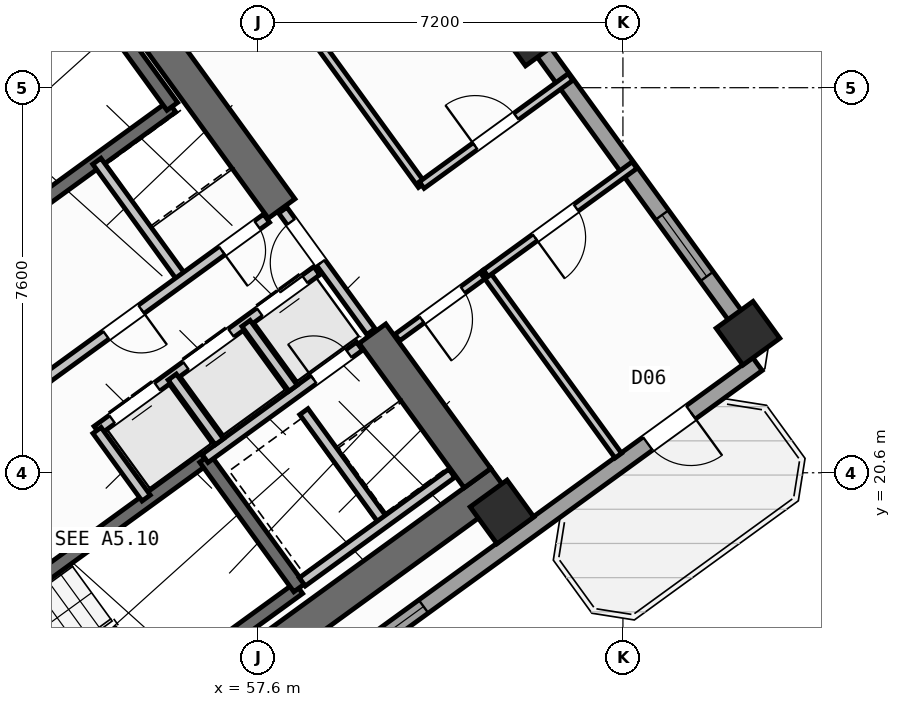
"""IFC4 building model, lengths in metres.
Left out: names, types, materials, properties, quantities, classifications, styles, units other than length and angle.
Written with IfcOpenShell. Run it as: python <this file> out.ifc"""

import sys

from ifc_helpers import new_model, si_unit, direction, frame, frame_2d, origin, origin_2d, place, context, subcontext, project, spatial, rectangle, hollow_rectangle, extrude, source, transform, mapped, element, fill, save


model = new_model("IFC4")
c1 = context("Model", 3, precision=1e-05, world=origin(), true_north=direction((0.0, 1.0)))
c2 = subcontext(c1, "Body", "Model", "MODEL_VIEW")
j1 = project(units=[si_unit("LENGTHUNIT", "METRE"), si_unit("PLANEANGLEUNIT", "RADIAN")], contexts=[c1])
p1 = place(None, origin())
s1 = spatial("IfcSite", under=j1, at=p1, CompositionType="ELEMENT")
p2 = place(p1, origin())
s2 = spatial("IfcBuilding", under=s1, at=p2, CompositionType="ELEMENT")
p3 = place(p2, frame((0.0, 0.0, 97.2)))
s3 = spatial("IfcBuildingStorey", under=s2, at=p3, CompositionType="ELEMENT", Elevation=97.2)
p4 = place(p3, frame((52.318, 13.11, 0.0), z_axis=(0.0, 0.0, 1.0), x_axis=(0.809019445368, 0.587781878776, 0.0)))
e1 = element("IfcWall", 1, at=p4, inside=s3, PredefinedType="SHEAR", context=c2, shape_type="SweptSolid", body=[
    extrude(rectangle(XDim=12.44, YDim=0.65, at=frame_2d((6.22, 0.0))), origin(), (0.0, 0.0, 1.0), 3.32),
])
p5 = place(p3, frame((44.325, 24.113, 0.0), z_axis=(0.0, 0.0, 1.0), x_axis=(0.809012664862, 0.58779121131, 0.0)))
e2 = element("IfcWall", 2, at=p5, inside=s3, PredefinedType="SHEAR", context=c2, shape_type="SweptSolid", body=[
    extrude(rectangle(XDim=12.44, YDim=0.65, at=frame_2d((6.22, 0.0))), origin(), (0.0, 0.0, 1.0), 3.32),
])
p6 = place(p3, frame((61.929, 20.494, 0.0), z_axis=(0.0, 0.0, 1.0), x_axis=(-0.58782982593, 0.808984607855, 0.0)))
e3 = element("IfcWall", 3, at=p6, inside=s3, PredefinedType="SHEAR", context=c2, shape_type="SweptSolid", body=[
    extrude(rectangle(XDim=3.525, YDim=0.65, at=frame_2d((1.762, 0.0))), origin(), (0.0, 0.0, 1.0), 3.32),
])
p7 = place(p3, frame((58.064, 25.813, 0.0), z_axis=(0.0, 0.0, 1.0), x_axis=(-0.58777996584, 0.809020835181, 0.0)))
e4 = element("IfcWall", 4, at=p7, inside=s3, PredefinedType="SHEAR", context=c2, shape_type="SweptSolid", body=[
    extrude(rectangle(XDim=6.375, YDim=0.65, at=frame_2d((3.188, 0.0))), origin(), (0.0, 0.0, 1.0), 3.32),
])
m1 = source(origin(), c2, "Body", "SweptSolid", [
    extrude(hollow_rectangle(XDim=0.9, YDim=0.9, WallThickness=0.036, at=origin_2d()), origin(), (0.0, 0.0, 1.0), 3.6),
])
for number, where, z_axis, x_axis in (
    (5, (62.414, 19.827, 0.0), (0.0, 0.0, 1.0), (0.809, 0.588, 0.0)),
    (6, (67.268, 23.354, 0.0), (0.0, 0.0, 1.0), (0.809, 0.588, 0.0)),
    (7, (62.977, 29.259, 0.0), (0.0, 0.0, 1.0), (0.809, 0.588, 0.0)),
):
    element("IfcColumn", number, at=place(p3, frame(where, z_axis=z_axis, x_axis=x_axis)), inside=s3, PredefinedType="COLUMN", context=c2, shape_type="MappedRepresentation", body=[
        mapped(m1, transform((0.0, 0.0, 0.0), scale=1.0)),
    ])
p8 = place(p3, frame((54.81, 40.5, 0.0), z_axis=(0.0, 0.0, 1.0), x_axis=(0.587783625747, -0.809018176127, 0.0)))
e8 = element("IfcWall", 8, at=p8, inside=s3, PredefinedType="STANDARD", context=c2, shape_type="SweptSolid", body=[
    extrude(rectangle(XDim=21.587, YDim=0.32, at=frame_2d((10.794, 0.0))), origin(), (0.0, 0.0, 1.0), 2.745),
])
p9 = place(p8, frame((2.143, 0.0, 0.8)))
e9 = element("IfcOpeningElement", 9, at=p9, cuts=e8, PredefinedType="OPENING", context=c2, shape_type="SweptSolid", body=[
    extrude(rectangle(XDim=2.1, YDim=1.55, at=frame_2d((1.05, 0.775))), frame((0.0, 0.17, 0.0), z_axis=(0.0, -1.0, 0.0), x_axis=(1.0, 0.0, 0.0)), (0.0, 0.0, 1.0), 0.34),
])
p10 = place(p8, frame((9.344, 0.0, 0.85)))
e10 = element("IfcOpeningElement", 10, at=p10, cuts=e8, PredefinedType="OPENING", context=c2, shape_type="SweptSolid", body=[
    extrude(rectangle(XDim=1.8, YDim=1.5, at=frame_2d((0.9, 0.75))), frame((0.0, 0.17, 0.0), z_axis=(0.0, -1.0, 0.0), x_axis=(1.0, 0.0, 0.0)), (0.0, 0.0, 1.0), 0.34),
])
p11 = place(p8, frame((18.309, 0.0, 0.85)))
e11 = element("IfcOpeningElement", 11, at=p11, cuts=e8, PredefinedType="OPENING", context=c2, shape_type="SweptSolid", body=[
    extrude(rectangle(XDim=1.5, YDim=1.5, at=frame_2d((0.75, 0.75))), frame((0.0, 0.17, 0.0), z_axis=(0.0, -1.0, 0.0), x_axis=(1.0, 0.0, 0.0)), (0.0, 0.0, 1.0), 0.34),
])
p12 = place(p3, frame((67.454, 22.747, 0.0), z_axis=(0.0, 0.0, 1.0), x_axis=(-0.809021120468, -0.587779573171, 0.0)))
e12 = element("IfcWall", 12, at=p12, inside=s3, PredefinedType="STANDARD", context=c2, shape_type="SweptSolid", body=[
    extrude(rectangle(XDim=17.588, YDim=0.32, at=frame_2d((8.794, 0.0))), origin(), (0.0, 0.0, 1.0), 3.32),
])
p13 = place(p12, frame((1.624, 0.0, 0.0)))
e13 = element("IfcOpeningElement", 13, at=p13, cuts=e12, PredefinedType="OPENING", context=c2, shape_type="SweptSolid", body=[
    extrude(rectangle(XDim=1.05, YDim=2.15, at=frame_2d((0.525, 1.075))), frame((0.0, 0.17, 0.0), z_axis=(0.0, -1.0, 0.0), x_axis=(1.0, 0.0, 0.0)), (0.0, 0.0, 1.0), 0.34),
])
p14 = place(p12, frame((8.144, 0.0, 0.8)))
e14 = element("IfcOpeningElement", 14, at=p14, cuts=e12, PredefinedType="OPENING", context=c2, shape_type="SweptSolid", body=[
    extrude(rectangle(XDim=2.1, YDim=1.55, at=frame_2d((1.05, 0.775))), frame((0.0, 0.17, 0.0), z_axis=(0.0, -1.0, 0.0), x_axis=(1.0, 0.0, 0.0)), (0.0, 0.0, 1.0), 0.34),
])
p15 = place(p12, frame((13.344, 0.0, 0.8)))
e15 = element("IfcOpeningElement", 15, at=p15, cuts=e12, PredefinedType="OPENING", context=c2, shape_type="SweptSolid", body=[
    extrude(rectangle(XDim=2.1, YDim=1.55, at=frame_2d((1.05, 0.775))), frame((0.0, 0.17, 0.0), z_axis=(0.0, -1.0, 0.0), x_axis=(1.0, 0.0, 0.0)), (0.0, 0.0, 1.0), 0.34),
])
p16 = place(p3, frame((48.006, 25.996, 0.0), z_axis=(0.0, 0.0, 1.0), x_axis=(0.80901903764, 0.587782439969, 0.0)))
e16 = element("IfcWall", 16, at=p16, inside=s3, PredefinedType="SHEAR", context=c2, shape_type="SweptSolid", body=[
    extrude(rectangle(XDim=7.46, YDim=0.26, at=frame_2d((3.73, 0.0))), origin(), (0.0, 0.0, 1.0), 3.32),
])
p17 = place(p3, frame((49.863, 23.44, 0.0), z_axis=(0.0, 0.0, 1.0), x_axis=(0.809003474932, 0.587803859759, 0.0)))
e17 = element("IfcWall", 17, at=p17, inside=s3, PredefinedType="SHEAR", context=c2, shape_type="SweptSolid", body=[
    extrude(rectangle(XDim=7.46, YDim=0.26, at=frame_2d((3.73, 0.0))), origin(), (0.0, 0.0, 1.0), 3.32),
])
p18 = place(p17, frame((0.36, 0.0, 0.0)))
e18 = element("IfcOpeningElement", 18, at=p18, cuts=e17, PredefinedType="OPENING", context=c2, shape_type="SweptSolid", body=[
    extrude(rectangle(XDim=0.86, YDim=2.05, at=frame_2d((0.43, 1.025))), frame((0.0, 0.14, 0.0), z_axis=(0.0, -1.0, 0.0), x_axis=(1.0, 0.0, 0.0)), (0.0, 0.0, 1.0), 0.28),
])
p19 = place(p3, frame((55.906, 27.831, 0.0), z_axis=(0.0, 0.0, 1.0), x_axis=(-0.587804123638, 0.809003283204, 0.0)))
e19 = element("IfcWall", 19, at=p19, inside=s3, PredefinedType="SHEAR", context=c2, shape_type="SweptSolid", body=[
    extrude(rectangle(XDim=3.16, YDim=0.26, at=frame_2d((1.58, 0.0))), origin(), (0.0, 0.0, 1.0), 3.32),
])
p20 = place(p3, frame((52.472, 14.013, 0.0), z_axis=(0.0, 0.0, 1.0), x_axis=(0.809028366311, 0.587769599847, 0.0)))
e20 = element("IfcWall", 20, at=p20, inside=s3, PredefinedType="SHEAR", context=c2, shape_type="SweptSolid", body=[
    extrude(rectangle(XDim=7.33, YDim=0.26, at=frame_2d((3.665, 0.0))), origin(), (0.0, 0.0, 1.0), 3.32),
])
p21 = place(p3, frame((50.615, 16.57, 0.0), z_axis=(0.0, 0.0, 1.0), x_axis=(0.809028366311, 0.587769599847, 0.0)))
e21 = element("IfcWall", 21, at=p21, inside=s3, PredefinedType="SHEAR", context=c2, shape_type="SweptSolid", body=[
    extrude(rectangle(XDim=7.33, YDim=0.26, at=frame_2d((3.665, 0.0))), origin(), (0.0, 0.0, 1.0), 3.32),
])
p22 = place(p21, frame((0.22, 0.0, 0.0)))
e22 = element("IfcOpeningElement", 22, at=p22, cuts=e21, PredefinedType="OPENING", context=c2, shape_type="SweptSolid", body=[
    extrude(rectangle(XDim=1.1, YDim=2.1, at=frame_2d((0.55, 1.05))), frame((0.0, 0.14, 0.0), z_axis=(0.0, -1.0, 0.0), x_axis=(1.0, 0.0, 0.0)), (0.0, 0.0, 1.0), 0.28),
])
p23 = place(p3, frame((58.41, 18.327, 0.0), z_axis=(0.0, 0.0, 1.0), x_axis=(-0.58776738483, 0.809029975545, 0.0)))
e23 = element("IfcWall", 23, at=p23, inside=s3, PredefinedType="SHEAR", context=c2, shape_type="SweptSolid", body=[
    extrude(rectangle(XDim=3.16, YDim=0.26, at=frame_2d((1.58, 0.0))), origin(), (0.0, 0.0, 1.0), 3.32),
])
p24 = place(p3, frame((56.553, 20.884, 0.0), z_axis=(0.0, 0.0, 1.0), x_axis=(0.809035789462, 0.587759382205, 0.0)))
e24 = element("IfcWall", 24, at=p24, inside=s3, PredefinedType="STANDARD", context=c2, shape_type="SweptSolid", body=[
    extrude(rectangle(XDim=3.768, YDim=0.2, at=frame_2d((1.884, 0.0))), origin(), (0.0, 0.0, 1.0), 3.31),
])
p25 = place(p24, frame((2.65, 0.0, 0.0)))
e25 = element("IfcOpeningElement", 25, at=p25, cuts=e24, PredefinedType="OPENING", context=c2, shape_type="SweptSolid", body=[
    extrude(rectangle(XDim=0.86, YDim=2.05, at=frame_2d((0.43, 1.025))), frame((0.0, 0.11, 0.0), z_axis=(0.0, -1.0, 0.0), x_axis=(1.0, 0.0, 0.0)), (0.0, 0.0, 1.0), 0.22),
])
p26 = place(p3, frame((54.421, 21.436, 0.0), z_axis=(0.0, 0.0, 1.0), x_axis=(0.809013710463, 0.587789772183, 0.0)))
e26 = element("IfcWall", 26, at=p26, inside=s3, PredefinedType="STANDARD", context=c2, shape_type="SweptSolid", body=[
    extrude(rectangle(XDim=5.36, YDim=0.2, at=frame_2d((2.68, 0.0))), origin(), (0.0, 0.0, 1.0), 3.31),
])
p27 = place(p26, frame((0.37, 0.0, 0.0)))
e27 = element("IfcOpeningElement", 27, at=p27, cuts=e26, PredefinedType="OPENING", context=c2, shape_type="SweptSolid", body=[
    extrude(rectangle(XDim=1.1, YDim=2.15, at=frame_2d((0.55, 1.075))), frame((0.0, 0.11, 0.0), z_axis=(0.0, -1.0, 0.0), x_axis=(1.0, 0.0, 0.0)), (0.0, 0.0, 1.0), 0.22),
])
p28 = place(p26, frame((2.17, 0.0, 0.0)))
e28 = element("IfcOpeningElement", 28, at=p28, cuts=e26, PredefinedType="OPENING", context=c2, shape_type="SweptSolid", body=[
    extrude(rectangle(XDim=1.1, YDim=2.15, at=frame_2d((0.55, 1.075))), frame((0.0, 0.11, 0.0), z_axis=(0.0, -1.0, 0.0), x_axis=(1.0, 0.0, 0.0)), (0.0, 0.0, 1.0), 0.22),
])
p29 = place(p26, frame((3.97, 0.0, 0.0)))
e29 = element("IfcOpeningElement", 29, at=p29, cuts=e26, PredefinedType="OPENING", context=c2, shape_type="SweptSolid", body=[
    extrude(rectangle(XDim=1.1, YDim=2.15, at=frame_2d((0.55, 1.075))), frame((0.0, 0.11, 0.0), z_axis=(0.0, -1.0, 0.0), x_axis=(1.0, 0.0, 0.0)), (0.0, 0.0, 1.0), 0.22),
])
p30 = place(p3, frame((55.391, 20.102, 0.0), z_axis=(0.0, 0.0, 1.0), x_axis=(-0.58778447739, 0.809017557374, 0.0)))
e30 = element("IfcWall", 30, at=p30, inside=s3, PredefinedType="STANDARD", context=c2, shape_type="SweptSolid", body=[
    extrude(rectangle(XDim=1.65, YDim=0.2, at=frame_2d((0.825, 0.0))), origin(), (0.0, 0.0, 1.0), 3.31),
])
p31 = place(p3, frame((56.834, 21.212, 0.0), z_axis=(0.0, 0.0, 1.0), x_axis=(-0.58776738483, 0.809029975545, 0.0)))
e31 = element("IfcWall", 31, at=p31, inside=s3, PredefinedType="STANDARD", context=c2, shape_type="SweptSolid", body=[
    extrude(rectangle(XDim=1.58, YDim=0.2, at=frame_2d((0.79, 0.0))), origin(), (0.0, 0.0, 1.0), 3.31),
])
p32 = place(p3, frame((58.29, 22.27, 0.0), z_axis=(0.0, 0.0, 1.0), x_axis=(-0.587840865826, 0.808976585857, 0.0)))
e32 = element("IfcWall", 32, at=p32, inside=s3, PredefinedType="STANDARD", context=c2, shape_type="SweptSolid", body=[
    extrude(rectangle(XDim=1.58, YDim=0.2, at=frame_2d((0.79, 0.0))), origin(), (0.0, 0.0, 1.0), 3.31),
])
p33 = place(p3, frame((60.067, 19.655, 0.0), z_axis=(0.0, 0.0, 1.0), x_axis=(-0.587800520745, 0.809005900975, 0.0)))
e33 = element("IfcWall", 33, at=p33, inside=s3, PredefinedType="STANDARD", context=c2, shape_type="SweptSolid", body=[
    extrude(rectangle(XDim=2.66, YDim=0.2, at=frame_2d((1.33, 0.0))), origin(), (0.0, 0.0, 1.0), 3.31),
])
p34 = place(p3, frame((58.472, 18.447, 0.0), z_axis=(0.0, 0.0, 1.0), x_axis=(0.809022487728, 0.587777691266, 0.0)))
e34 = element("IfcWall", 34, at=p34, inside=s3, PredefinedType="STANDARD", context=c2, shape_type="SweptSolid", body=[
    extrude(rectangle(XDim=3.648, YDim=0.2, at=frame_2d((1.824, 0.0))), origin(), (0.0, 0.0, 1.0), 3.31),
])
p35 = place(p3, frame((56.111, 24.419, 0.0), z_axis=(0.0, 0.0, 1.0), x_axis=(-0.58777848983, 0.809021907548, 0.0)))
e35 = element("IfcWall", 35, at=p35, inside=s3, PredefinedType="STANDARD", context=c2, shape_type="SweptSolid", body=[
    extrude(rectangle(XDim=2.88, YDim=0.2, at=frame_2d((1.44, 0.0))), origin(), (0.0, 0.0, 1.0), 3.31),
])
p36 = place(p3, frame((53.425, 22.468, 0.0), z_axis=(0.0, 0.0, 1.0), x_axis=(0.80902705128, 0.587771409902, 0.0)))
e36 = element("IfcWall", 36, at=p36, inside=s3, PredefinedType="STANDARD", context=c2, shape_type="SweptSolid", body=[
    extrude(rectangle(XDim=5.368, YDim=0.2, at=frame_2d((2.684, 0.0))), origin(), (0.0, 0.0, 1.0), 3.31),
])
p37 = place(p36, frame((4.28, 0.0, 0.0)))
e37 = element("IfcOpeningElement", 37, at=p37, cuts=e36, PredefinedType="OPENING", context=c2, shape_type="SweptSolid", body=[
    extrude(rectangle(XDim=0.86, YDim=2.05, at=frame_2d((0.43, 1.025))), frame((0.0, 0.11, 0.0), z_axis=(0.0, -1.0, 0.0), x_axis=(1.0, 0.0, 0.0)), (0.0, 0.0, 1.0), 0.22),
])
p38 = place(p36, frame((1.45, 0.0, 0.0)))
e38 = element("IfcOpeningElement", 38, at=p38, cuts=e36, PredefinedType="OPENING", context=c2, shape_type="SweptSolid", body=[
    extrude(rectangle(XDim=0.86, YDim=2.05, at=frame_2d((0.43, 1.025))), frame((0.0, 0.11, 0.0), z_axis=(0.0, -1.0, 0.0), x_axis=(1.0, 0.0, 0.0)), (0.0, 0.0, 1.0), 0.22),
])
p39 = place(p3, frame((59.827, 23.386, 0.0), z_axis=(0.0, 0.0, 1.0), x_axis=(-0.587803840107, 0.809003489211, 0.0)))
e39 = element("IfcWall", 39, at=p39, inside=s3, PredefinedType="STANDARD", context=c2, shape_type="SweptSolid", body=[
    extrude(rectangle(XDim=2.96, YDim=0.2, at=frame_2d((1.48, 0.0))), origin(), (0.0, 0.0, 1.0), 3.31),
])
p40 = place(p39, frame((1.68, 0.0, 0.0)))
e40 = element("IfcOpeningElement", 40, at=p40, cuts=e39, PredefinedType="OPENING", context=c2, shape_type="SweptSolid", body=[
    extrude(rectangle(XDim=1.0, YDim=2.1, at=frame_2d((0.5, 1.05))), frame((0.0, 0.11, 0.0), z_axis=(0.0, -1.0, 0.0), x_axis=(1.0, 0.0, 0.0)), (0.0, 0.0, 1.0), 0.22),
])
p41 = place(p3, frame((60.347, 23.27, 0.0), z_axis=(0.0, 0.0, 1.0), x_axis=(0.80899039758, 0.587821857898, 0.0)))
e41 = element("IfcWall", 41, at=p41, inside=s3, PredefinedType="PARTITIONING", context=c2, shape_type="SweptSolid", body=[
    extrude(rectangle(XDim=2.158, YDim=0.16, at=frame_2d((1.079, 0.0))), origin(), (0.0, 0.0, 1.0), 3.31),
])
p42 = place(p41, frame((0.598, 0.0, 0.0)))
e42 = element("IfcOpeningElement", 42, at=p42, cuts=e41, PredefinedType="OPENING", context=c2, shape_type="SweptSolid", body=[
    extrude(rectangle(XDim=1.0, YDim=2.1, at=frame_2d((0.5, 1.05))), frame((0.0, 0.09, 0.0), z_axis=(0.0, -1.0, 0.0), x_axis=(1.0, 0.0, 0.0)), (0.0, 0.0, 1.0), 0.18),
])
p43 = place(p3, frame((64.709, 20.938, 0.0), z_axis=(0.0, 0.0, 1.0), x_axis=(-0.587773666605, 0.809025411743, 0.0)))
e43 = element("IfcWall", 43, at=p43, inside=s3, PredefinedType="PARTITIONING", context=c2, shape_type="SweptSolid", body=[
    extrude(rectangle(XDim=4.45, YDim=0.16, at=frame_2d((2.225, 0.0))), origin(), (0.0, 0.0, 1.0), 3.31),
])
p44 = place(p3, frame((60.829, 26.278, 0.0), z_axis=(0.0, 0.0, 1.0), x_axis=(-0.587777474174, 0.809022645451, 0.0)))
e44 = element("IfcWall", 44, at=p44, inside=s3, PredefinedType="PARTITIONING", context=c2, shape_type="SweptSolid", body=[
    extrude(rectangle(XDim=15.1, YDim=0.16, at=frame_2d((7.55, 0.0))), origin(), (0.0, 0.0, 1.0), 3.31),
])
p45 = place(p3, frame((62.093, 24.538, 0.0), z_axis=(0.0, 0.0, 1.0), x_axis=(0.809035546126, 0.58775971715, 0.0)))
e45 = element("IfcWall", 45, at=p45, inside=s3, PredefinedType="PARTITIONING", context=c2, shape_type="SweptSolid", body=[
    extrude(rectangle(XDim=3.63, YDim=0.16, at=frame_2d((1.815, 0.0))), origin(), (0.0, 0.0, 1.0), 3.31),
])
p46 = place(p45, frame((1.2, 0.0, 0.0)))
e46 = element("IfcOpeningElement", 46, at=p46, cuts=e45, PredefinedType="OPENING", context=c2, shape_type="SweptSolid", body=[
    extrude(rectangle(XDim=1.0, YDim=2.1, at=frame_2d((0.5, 1.05))), frame((0.0, 0.09, 0.0), z_axis=(0.0, -1.0, 0.0), x_axis=(1.0, 0.0, 0.0)), (0.0, 0.0, 1.0), 0.18),
])
p47 = place(p3, frame((60.829, 26.278, 0.0), z_axis=(0.0, 0.0, 1.0), x_axis=(0.809003564202, 0.587803736896, 0.0)))
e47 = element("IfcWall", 47, at=p47, inside=s3, PredefinedType="PARTITIONING", context=c2, shape_type="SweptSolid", body=[
    extrude(rectangle(XDim=3.63, YDim=0.16, at=frame_2d((1.815, 0.0))), origin(), (0.0, 0.0, 1.0), 3.31),
])
p48 = place(p47, frame((1.305, 0.0, 0.0)))
e48 = element("IfcOpeningElement", 48, at=p48, cuts=e47, PredefinedType="OPENING", context=c2, shape_type="SweptSolid", body=[
    extrude(rectangle(XDim=1.0, YDim=2.1, at=frame_2d((0.5, 1.05))), frame((0.0, 0.09, 0.0), z_axis=(0.0, -1.0, 0.0), x_axis=(1.0, 0.0, 0.0)), (0.0, 0.0, 1.0), 0.18),
])
p49 = place(p3, frame((42.866, 26.044, 0.0), z_axis=(0.0, 0.0, 1.0), x_axis=(0.809020254154, 0.587780765566, 0.0)))
e49 = element("IfcWall", 49, at=p49, inside=s3, PredefinedType="PARTITIONING", context=c2, shape_type="SweptSolid", body=[
    extrude(rectangle(XDim=14.67, YDim=0.16, at=frame_2d((7.335, 0.0))), origin(), (0.0, 0.0, 1.0), 3.31),
])
p50 = place(p49, frame((10.2, 0.0, 0.0)))
e50 = element("IfcOpeningElement", 50, at=p50, cuts=e49, PredefinedType="OPENING", context=c2, shape_type="SweptSolid", body=[
    extrude(rectangle(XDim=1.0, YDim=2.1, at=frame_2d((0.5, 1.05))), frame((0.0, 0.09, 0.0), z_axis=(0.0, -1.0, 0.0), x_axis=(1.0, 0.0, 0.0)), (0.0, 0.0, 1.0), 0.18),
])
m2 = source(origin(), c2, "Body", "SweptSolid", [
    extrude(rectangle(XDim=1.05, YDim=2.15, at=frame_2d((0.525, 1.075))), frame((0.0, 0.025, 0.0), z_axis=(0.0, -1.0, 0.0), x_axis=(1.0, 0.0, 0.0)), (0.0, 0.0, 1.0), 0.05),
])
p51 = place(p13, origin())
e51 = element("IfcDoor", 51, at=p51, inside=s3, OperationType="SINGLE_SWING_LEFT", PredefinedType="DOOR", context=c2, shape_type="MappedRepresentation", body=[
    mapped(m2, transform((0.0, 0.0, 0.0), scale=1.0)),
])
fill(e13, e51)
m3 = source(origin(), c2, "Body", "SweptSolid", [
    extrude(rectangle(XDim=1.5, YDim=1.5, at=frame_2d((0.75, 0.75))), frame((0.0, 0.03, 0.0), z_axis=(0.0, -1.0, 0.0), x_axis=(1.0, 0.0, 0.0)), (0.0, 0.0, 1.0), 0.06),
])
p52 = place(p11, origin())
e52 = element("IfcWindow", 52, at=p52, inside=s3, PartitioningType="SINGLE_PANEL", PredefinedType="WINDOW", context=c2, shape_type="MappedRepresentation", body=[
    mapped(m3, transform((0.0, 0.0, 0.0), scale=1.0)),
])
fill(e11, e52)
m4 = source(origin(), c2, "Body", "SweptSolid", [
    extrude(rectangle(XDim=2.1, YDim=1.55, at=frame_2d((1.05, 0.775))), frame((0.0, 0.03, 0.0), z_axis=(0.0, -1.0, 0.0), x_axis=(1.0, 0.0, 0.0)), (0.0, 0.0, 1.0), 0.06),
])
p53 = place(p14, origin())
e53 = element("IfcWindow", 53, at=p53, inside=s3, PartitioningType="SINGLE_PANEL", PredefinedType="WINDOW", context=c2, shape_type="MappedRepresentation", body=[
    mapped(m4, transform((0.0, 0.0, 0.0), scale=1.0)),
])
fill(e14, e53)
m5 = source(origin(), c2, "Body", "SweptSolid", [
    extrude(rectangle(XDim=1.1, YDim=2.15, at=frame_2d((0.55, 1.075))), frame((0.0, 0.025, 0.0), z_axis=(0.0, -1.0, 0.0), x_axis=(1.0, 0.0, 0.0)), (0.0, 0.0, 1.0), 0.05),
])
p54 = place(p27, origin())
e54 = element("IfcDoor", 54, at=p54, inside=s3, OperationType="DOUBLE_DOOR_SLIDING", PredefinedType="DOOR", context=c2, shape_type="MappedRepresentation", body=[
    mapped(m5, transform((0.0, 0.0, 0.0), scale=1.0)),
])
fill(e27, e54)
p55 = place(p28, origin())
e55 = element("IfcDoor", 55, at=p55, inside=s3, OperationType="DOUBLE_DOOR_SLIDING", PredefinedType="DOOR", context=c2, shape_type="MappedRepresentation", body=[
    mapped(m5, transform((0.0, 0.0, 0.0), scale=1.0)),
])
fill(e28, e55)
p56 = place(p29, origin())
e56 = element("IfcDoor", 56, at=p56, inside=s3, OperationType="DOUBLE_DOOR_SLIDING", PredefinedType="DOOR", context=c2, shape_type="MappedRepresentation", body=[
    mapped(m5, transform((0.0, 0.0, 0.0), scale=1.0)),
])
fill(e29, e56)
m6 = source(origin(), c2, "Body", "SweptSolid", [
    extrude(rectangle(XDim=0.86, YDim=2.05, at=frame_2d((0.43, 1.025))), frame((0.0, 0.025, 0.0), z_axis=(0.0, -1.0, 0.0), x_axis=(1.0, 0.0, 0.0)), (0.0, 0.0, 1.0), 0.05),
])
p57 = place(p25, origin())
e57 = element("IfcDoor", 57, at=p57, inside=s3, OperationType="SINGLE_SWING_LEFT", PredefinedType="DOOR", context=c2, shape_type="MappedRepresentation", body=[
    mapped(m6, transform((0.0, 0.0, 0.0), scale=1.0)),
])
fill(e25, e57)
p58 = place(p37, frame((0.86, 0.0, 0.0), z_axis=(0.0, 0.0, 1.0), x_axis=(-1.0, 0.0, 0.0)))
e58 = element("IfcDoor", 58, at=p58, inside=s3, OperationType="SINGLE_SWING_RIGHT", PredefinedType="DOOR", context=c2, shape_type="MappedRepresentation", body=[
    mapped(m6, transform((0.0, 0.0, 0.0), scale=1.0)),
])
fill(e37, e58)
p59 = place(p38, frame((0.86, 0.0, 0.0), z_axis=(0.0, 0.0, 1.0), x_axis=(-1.0, 0.0, 0.0)))
e59 = element("IfcDoor", 59, at=p59, inside=s3, OperationType="SINGLE_SWING_LEFT", PredefinedType="DOOR", context=c2, shape_type="MappedRepresentation", body=[
    mapped(m6, transform((0.0, 0.0, 0.0), scale=1.0)),
])
fill(e38, e59)
m7 = source(origin(), c2, "Body", "SweptSolid", [
    extrude(rectangle(XDim=1.0, YDim=2.1, at=frame_2d((0.5, 1.05))), frame((0.0, 0.025, 0.0), z_axis=(0.0, -1.0, 0.0), x_axis=(1.0, 0.0, 0.0)), (0.0, 0.0, 1.0), 0.05),
])
p60 = place(p42, frame((1.0, 0.0, 0.0), z_axis=(0.0, 0.0, 1.0), x_axis=(-1.0, 0.0, 0.0)))
e60 = element("IfcDoor", 60, at=p60, inside=s3, OperationType="SINGLE_SWING_RIGHT", PredefinedType="DOOR", context=c2, shape_type="MappedRepresentation", body=[
    mapped(m7, transform((0.0, 0.0, 0.0), scale=1.0)),
])
fill(e42, e60)
p61 = place(p40, origin())
e61 = element("IfcDoor", 61, at=p61, inside=s3, OperationType="SINGLE_SWING_LEFT", PredefinedType="DOOR", context=c2, shape_type="MappedRepresentation", body=[
    mapped(m7, transform((0.0, 0.0, 0.0), scale=1.0)),
])
fill(e40, e61)
p62 = place(p48, origin())
e62 = element("IfcDoor", 62, at=p62, inside=s3, OperationType="SINGLE_SWING_LEFT", PredefinedType="DOOR", context=c2, shape_type="MappedRepresentation", body=[
    mapped(m7, transform((0.0, 0.0, 0.0), scale=1.0)),
])
fill(e48, e62)
p63 = place(p46, frame((1.0, 0.0, 0.0), z_axis=(0.0, 0.0, 1.0), x_axis=(-1.0, 0.0, 0.0)))
e63 = element("IfcDoor", 63, at=p63, inside=s3, OperationType="SINGLE_SWING_RIGHT", PredefinedType="DOOR", context=c2, shape_type="MappedRepresentation", body=[
    mapped(m7, transform((0.0, 0.0, 0.0), scale=1.0)),
])
fill(e46, e63)
save(model, sys.argv[1])
